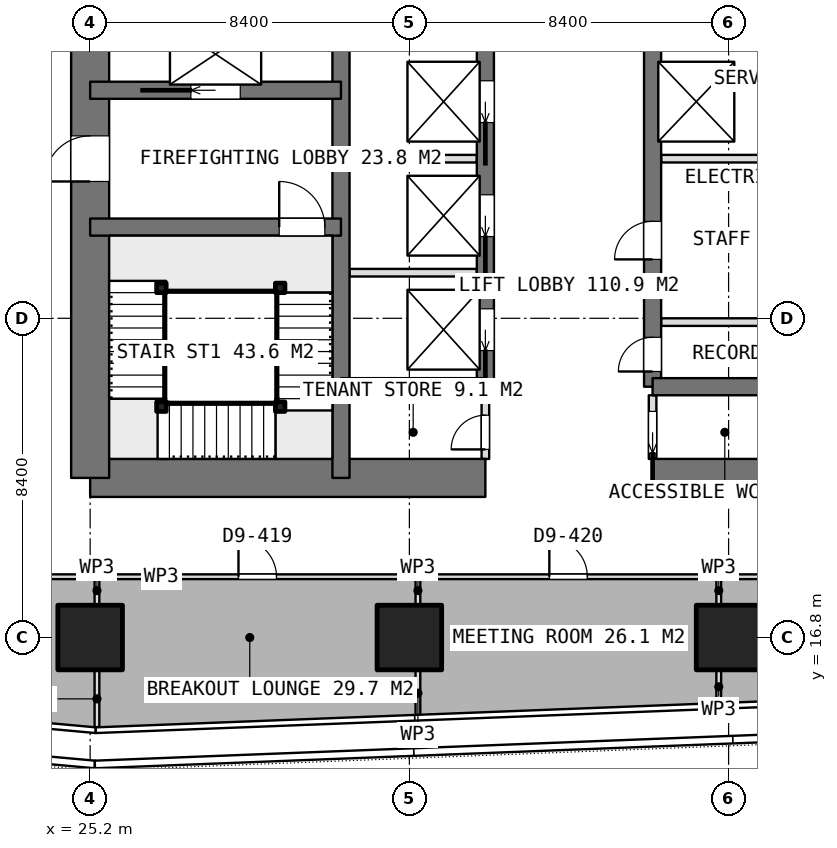
"""IFC4 building model, lengths in metres.
Left out: names, types, materials, properties, quantities, classifications, styles, units other than length and angle.
Written with IfcOpenShell. Run it as: python <this file> out.ifc"""

import sys

from ifc_helpers import new_model, si_unit, direction, frame, frame_2d, origin, origin_2d, place, context, subcontext, project, spatial, rectangle, extrude, element, fill, save


model = new_model("IFC4")
c1 = context("Model", 3, precision=1e-05, world=origin(), true_north=direction((0.0, 1.0)))
c2 = subcontext(c1, "Body", "Model", "MODEL_VIEW")
j1 = project(units=[si_unit("LENGTHUNIT", "METRE"), si_unit("PLANEANGLEUNIT", "RADIAN")], contexts=[c1])
p1 = place(None, origin())
s1 = spatial("IfcSite", under=j1, at=p1, CompositionType="ELEMENT")
p2 = place(p1, origin())
s2 = spatial("IfcBuilding", under=s1, at=p2, CompositionType="ELEMENT")
p3 = place(p2, frame((0.0, 0.0, 117.8)))
s3 = spatial("IfcBuildingStorey", under=s2, at=p3, CompositionType="ELEMENT", Elevation=117.8)
p4 = place(p3, frame((25.2, 21.0, 0.0), z_axis=(0.0, 0.0, 1.0), x_axis=(1.0, 0.0, 0.0)))
e1 = element("IfcWall", 1, at=p4, inside=s3, PredefinedType="SHEAR", context=c2, shape_type="SweptSolid", body=[
    extrude(rectangle(XDim=10.4, YDim=1.0, at=frame_2d((5.2, 0.0))), origin(), (0.0, 0.0, 1.0), 3.75),
])
p5 = place(p3, frame((40.0, 21.0, 0.0), z_axis=(0.0, 0.0, 1.0), x_axis=(1.0, 0.0, 0.0)))
e2 = element("IfcWall", 2, at=p5, inside=s3, PredefinedType="SHEAR", context=c2, shape_type="SweptSolid", body=[
    extrude(rectangle(XDim=10.4, YDim=1.0, at=frame_2d((5.2, 0.0))), origin(), (0.0, 0.0, 1.0), 3.75),
])
p6 = place(p3, frame((25.2, 21.0, 0.0), z_axis=(0.0, 0.0, 1.0), x_axis=(0.0, 1.0, 0.0)))
e3 = element("IfcWall", 3, at=p6, inside=s3, PredefinedType="SHEAR", context=c2, shape_type="SweptSolid", body=[
    extrude(rectangle(XDim=25.2, YDim=1.0, at=frame_2d((12.6, 0.0))), origin(), (0.0, 0.0, 1.0), 3.75),
])
p7 = place(p6, frame((7.8, 0.0, 0.0)))
e4 = element("IfcOpeningElement", 4, at=p7, cuts=e3, PredefinedType="OPENING", context=c2, shape_type="SweptSolid", body=[
    extrude(rectangle(XDim=1.2, YDim=2.1, at=frame_2d((0.6, 1.05))), frame((0.0, 0.51, 0.0), z_axis=(0.0, -1.0, 0.0), x_axis=(1.0, 0.0, 0.0)), (0.0, 0.0, 1.0), 1.02),
])
p8 = place(p6, frame((14.25, 0.0, 0.0)))
e5 = element("IfcOpeningElement", 5, at=p8, cuts=e3, PredefinedType="OPENING", context=c2, shape_type="SweptSolid", body=[
    extrude(rectangle(XDim=0.9, YDim=2.1, at=frame_2d((0.45, 1.05))), frame((0.0, 0.51, 0.0), z_axis=(0.0, -1.0, 0.0), x_axis=(1.0, 0.0, 0.0)), (0.0, 0.0, 1.0), 1.02),
])
p9 = place(p6, frame((16.85, 0.0, 0.0)))
e6 = element("IfcOpeningElement", 6, at=p9, cuts=e3, PredefinedType="OPENING", context=c2, shape_type="SweptSolid", body=[
    extrude(rectangle(XDim=0.9, YDim=2.1, at=frame_2d((0.45, 1.05))), frame((0.0, 0.51, 0.0), z_axis=(0.0, -1.0, 0.0), x_axis=(1.0, 0.0, 0.0)), (0.0, 0.0, 1.0), 1.02),
])
p10 = place(p6, frame((19.025, 0.0, 0.0)))
e7 = element("IfcOpeningElement", 7, at=p10, cuts=e3, PredefinedType="OPENING", context=c2, shape_type="SweptSolid", body=[
    extrude(rectangle(XDim=1.2, YDim=2.1, at=frame_2d((0.6, 1.05))), frame((0.0, 0.51, 0.0), z_axis=(0.0, -1.0, 0.0), x_axis=(1.0, 0.0, 0.0)), (0.0, 0.0, 1.0), 1.02),
])
p11 = place(p3, frame((31.8, 21.0, 0.0), z_axis=(0.0, 0.0, 1.0), x_axis=(0.0, 1.0, 0.0)))
e8 = element("IfcWall", 8, at=p11, inside=s3, PredefinedType="SHEAR", context=c2, shape_type="SweptSolid", body=[
    extrude(rectangle(XDim=25.2, YDim=0.45, at=frame_2d((12.6, 0.0))), origin(), (0.0, 0.0, 1.0), 3.75),
])
p12 = place(p3, frame((35.6, 23.4, 0.0), z_axis=(0.0, 0.0, 1.0), x_axis=(0.0, 1.0, 0.0)))
e9 = element("IfcWall", 9, at=p12, inside=s3, PredefinedType="SHEAR", context=c2, shape_type="SweptSolid", body=[
    extrude(rectangle(XDim=18.0, YDim=0.45, at=frame_2d((9.0, 0.0))), origin(), (0.0, 0.0, 1.0), 3.75),
])
p13 = place(p12, frame((0.95, 0.0, 0.0)))
e10 = element("IfcOpeningElement", 10, at=p13, cuts=e9, PredefinedType="OPENING", context=c2, shape_type="SweptSolid", body=[
    extrude(rectangle(XDim=1.1, YDim=2.1, at=frame_2d((0.55, 1.05))), frame((0.0, 0.235, 0.0), z_axis=(0.0, -1.0, 0.0), x_axis=(1.0, 0.0, 0.0)), (0.0, 0.0, 1.0), 0.47),
])
p14 = place(p12, frame((3.95, 0.0, 0.0)))
e11 = element("IfcOpeningElement", 11, at=p14, cuts=e9, PredefinedType="OPENING", context=c2, shape_type="SweptSolid", body=[
    extrude(rectangle(XDim=1.1, YDim=2.1, at=frame_2d((0.55, 1.05))), frame((0.0, 0.235, 0.0), z_axis=(0.0, -1.0, 0.0), x_axis=(1.0, 0.0, 0.0)), (0.0, 0.0, 1.0), 0.47),
])
p15 = place(p12, frame((6.95, 0.0, 0.0)))
e12 = element("IfcOpeningElement", 12, at=p15, cuts=e9, PredefinedType="OPENING", context=c2, shape_type="SweptSolid", body=[
    extrude(rectangle(XDim=1.1, YDim=2.1, at=frame_2d((0.55, 1.05))), frame((0.0, 0.235, 0.0), z_axis=(0.0, -1.0, 0.0), x_axis=(1.0, 0.0, 0.0)), (0.0, 0.0, 1.0), 0.47),
])
p16 = place(p12, frame((9.95, 0.0, 0.0)))
e13 = element("IfcOpeningElement", 13, at=p16, cuts=e9, PredefinedType="OPENING", context=c2, shape_type="SweptSolid", body=[
    extrude(rectangle(XDim=1.1, YDim=2.1, at=frame_2d((0.55, 1.05))), frame((0.0, 0.235, 0.0), z_axis=(0.0, -1.0, 0.0), x_axis=(1.0, 0.0, 0.0)), (0.0, 0.0, 1.0), 0.47),
])
p17 = place(p12, frame((12.95, 0.0, 0.0)))
e14 = element("IfcOpeningElement", 14, at=p17, cuts=e9, PredefinedType="OPENING", context=c2, shape_type="SweptSolid", body=[
    extrude(rectangle(XDim=1.1, YDim=2.1, at=frame_2d((0.55, 1.05))), frame((0.0, 0.235, 0.0), z_axis=(0.0, -1.0, 0.0), x_axis=(1.0, 0.0, 0.0)), (0.0, 0.0, 1.0), 0.47),
])
p18 = place(p12, frame((15.95, 0.0, 0.0)))
e15 = element("IfcOpeningElement", 15, at=p18, cuts=e9, PredefinedType="OPENING", context=c2, shape_type="SweptSolid", body=[
    extrude(rectangle(XDim=1.1, YDim=2.1, at=frame_2d((0.55, 1.05))), frame((0.0, 0.235, 0.0), z_axis=(0.0, -1.0, 0.0), x_axis=(1.0, 0.0, 0.0)), (0.0, 0.0, 1.0), 0.47),
])
p19 = place(p3, frame((40.0, 23.4, 0.0), z_axis=(0.0, 0.0, 1.0), x_axis=(0.0, 1.0, 0.0)))
e16 = element("IfcWall", 16, at=p19, inside=s3, PredefinedType="SHEAR", context=c2, shape_type="SweptSolid", body=[
    extrude(rectangle(XDim=18.0, YDim=0.45, at=frame_2d((9.0, 0.0))), origin(), (0.0, 0.0, 1.0), 3.75),
])
p20 = place(p19, frame((0.4, 0.0, 0.0)))
e17 = element("IfcOpeningElement", 17, at=p20, cuts=e16, PredefinedType="OPENING", context=c2, shape_type="SweptSolid", body=[
    extrude(rectangle(XDim=0.9, YDim=2.1, at=frame_2d((0.45, 1.05))), frame((0.0, 0.235, 0.0), z_axis=(0.0, -1.0, 0.0), x_axis=(1.0, 0.0, 0.0)), (0.0, 0.0, 1.0), 0.47),
])
p21 = place(p19, frame((3.35, 0.0, 0.0)))
e18 = element("IfcOpeningElement", 18, at=p21, cuts=e16, PredefinedType="OPENING", context=c2, shape_type="SweptSolid", body=[
    extrude(rectangle(XDim=1.0, YDim=2.1, at=frame_2d((0.5, 1.05))), frame((0.0, 0.235, 0.0), z_axis=(0.0, -1.0, 0.0), x_axis=(1.0, 0.0, 0.0)), (0.0, 0.0, 1.0), 0.47),
])
for number, where, z_axis, x_axis in (
    (19, (31.8, 23.4, 0.0), (0.0, 0.0, 1.0), (1.0, 0.0, 0.0)),
    (20, (40.0, 23.4, 0.0), (0.0, 0.0, 1.0), (1.0, 0.0, 0.0)),
):
    element("IfcWall", number, at=place(p3, frame(where, z_axis=z_axis, x_axis=x_axis)), inside=s3, PredefinedType="SHEAR", context=c2, shape_type="SweptSolid", body=[
        extrude(rectangle(XDim=3.8, YDim=0.45, at=frame_2d((1.9, 0.0))), origin(), (0.0, 0.0, 1.0), 3.75),
    ])
p22 = place(p3, frame((25.2, 27.6, 0.0), z_axis=(0.0, 0.0, 1.0), x_axis=(1.0, 0.0, 0.0)))
e21 = element("IfcWall", 21, at=p22, inside=s3, PredefinedType="SHEAR", context=c2, shape_type="SweptSolid", body=[
    extrude(rectangle(XDim=6.6, YDim=0.45, at=frame_2d((3.3, 0.0))), origin(), (0.0, 0.0, 1.0), 3.75),
])
p23 = place(p22, frame((4.975, 0.0, 0.0)))
e22 = element("IfcOpeningElement", 22, at=p23, cuts=e21, PredefinedType="OPENING", context=c2, shape_type="SweptSolid", body=[
    extrude(rectangle(XDim=1.2, YDim=2.1, at=frame_2d((0.6, 1.05))), frame((0.0, 0.235, 0.0), z_axis=(0.0, -1.0, 0.0), x_axis=(1.0, 0.0, 0.0)), (0.0, 0.0, 1.0), 0.47),
])
p24 = place(p3, frame((25.2, 31.2, 0.0), z_axis=(0.0, 0.0, 1.0), x_axis=(1.0, 0.0, 0.0)))
e23 = element("IfcWall", 23, at=p24, inside=s3, PredefinedType="SHEAR", context=c2, shape_type="SweptSolid", body=[
    extrude(rectangle(XDim=6.6, YDim=0.45, at=frame_2d((3.3, 0.0))), origin(), (0.0, 0.0, 1.0), 3.75),
])
p25 = place(p24, frame((2.65, 0.0, 0.0)))
e24 = element("IfcOpeningElement", 24, at=p25, cuts=e23, PredefinedType="OPENING", context=c2, shape_type="SweptSolid", body=[
    extrude(rectangle(XDim=1.3, YDim=2.1, at=frame_2d((0.65, 1.05))), frame((0.0, 0.235, 0.0), z_axis=(0.0, -1.0, 0.0), x_axis=(1.0, 0.0, 0.0)), (0.0, 0.0, 1.0), 0.47),
])
for number, where, z_axis, x_axis in (
    (25, (25.2, 16.8, 0.0), (0.0, 0.0, 1.0), (1.0, 0.0, 0.0)),
    (26, (33.6, 16.8, 0.0), (0.0, 0.0, 1.0), (1.0, 0.0, 0.0)),
    (27, (42.0, 16.8, 0.0), (0.0, 0.0, 1.0), (1.0, 0.0, 0.0)),
):
    element("IfcColumn", number, at=place(p3, frame(where, z_axis=z_axis, x_axis=x_axis)), inside=s3, PredefinedType="COLUMN", context=c2, shape_type="SweptSolid", body=[
        extrude(rectangle(XDim=1.7, YDim=1.7, at=origin_2d()), origin(), (0.0, 0.0, 1.0), 3.75),
    ])
for number, where, z_axis, x_axis in (
    (28, (32.025, 26.4, 0.0), (0.0, 0.0, 1.0), (1.0, 0.0, 0.0)),
    (29, (32.025, 29.4, 0.0), (0.0, 0.0, 1.0), (1.0, 0.0, 0.0)),
):
    element("IfcWall", number, at=place(p3, frame(where, z_axis=z_axis, x_axis=x_axis)), inside=s3, PredefinedType="PARTITIONING", context=c2, shape_type="SweptSolid", body=[
        extrude(rectangle(XDim=3.35, YDim=0.2, at=frame_2d((1.675, 0.0))), origin(), (0.0, 0.0, 1.0), 3.5),
    ])
p26 = place(p3, frame((40.225, 29.4, 0.0), z_axis=(0.0, 0.0, 1.0), x_axis=(1.0, 0.0, 0.0)))
e30 = element("IfcWall", 30, at=p26, inside=s3, PredefinedType="PARTITIONING", context=c2, shape_type="SweptSolid", body=[
    extrude(rectangle(XDim=3.35, YDim=0.2, at=frame_2d((1.675, 0.0))), origin(), (0.0, 0.0, 1.0), 3.5),
])
p27 = place(p3, frame((40.0, 21.5, 0.0), z_axis=(0.0, 0.0, 1.0), x_axis=(0.0, 1.0, 0.0)))
e31 = element("IfcWall", 31, at=p27, inside=s3, PredefinedType="PARTITIONING", context=c2, shape_type="SweptSolid", body=[
    extrude(rectangle(XDim=1.675, YDim=0.2, at=frame_2d((0.837, 0.0))), origin(), (0.0, 0.0, 1.0), 3.5),
])
p28 = place(p27, frame((0.15, 0.0, 0.0)))
e32 = element("IfcOpeningElement", 32, at=p28, cuts=e31, PredefinedType="OPENING", context=c2, shape_type="SweptSolid", body=[
    extrude(rectangle(XDim=1.1, YDim=2.1, at=frame_2d((0.55, 1.05))), frame((0.0, 0.11, 0.0), z_axis=(0.0, -1.0, 0.0), x_axis=(1.0, 0.0, 0.0)), (0.0, 0.0, 1.0), 0.22),
])
p29 = place(p3, frame((35.6, 21.5, 0.0), z_axis=(0.0, 0.0, 1.0), x_axis=(0.0, 1.0, 0.0)))
e33 = element("IfcWall", 33, at=p29, inside=s3, PredefinedType="PARTITIONING", context=c2, shape_type="SweptSolid", body=[
    extrude(rectangle(XDim=1.675, YDim=0.2, at=frame_2d((0.837, 0.0))), origin(), (0.0, 0.0, 1.0), 3.5),
])
p30 = place(p29, frame((0.25, 0.0, 0.0)))
e34 = element("IfcOpeningElement", 34, at=p30, cuts=e33, PredefinedType="OPENING", context=c2, shape_type="SweptSolid", body=[
    extrude(rectangle(XDim=0.9, YDim=2.1, at=frame_2d((0.45, 1.05))), frame((0.0, 0.11, 0.0), z_axis=(0.0, -1.0, 0.0), x_axis=(1.0, 0.0, 0.0)), (0.0, 0.0, 1.0), 0.22),
])
p31 = place(p3, frame((40.225, 25.1, 0.0), z_axis=(0.0, 0.0, 1.0), x_axis=(1.0, 0.0, 0.0)))
e35 = element("IfcWall", 35, at=p31, inside=s3, PredefinedType="PARTITIONING", context=c2, shape_type="SweptSolid", body=[
    extrude(rectangle(XDim=3.35, YDim=0.2, at=frame_2d((1.675, 0.0))), origin(), (0.0, 0.0, 1.0), 3.5),
])
p32 = place(p3, frame((41.741, 18.4, 0.0), z_axis=(0.0, 0.0, 1.0), x_axis=(1.0, 0.0, 0.0)))
e36 = element("IfcWall", 36, at=p32, inside=s3, PredefinedType="PARTITIONING", context=c2, shape_type="SweptSolid", body=[
    extrude(rectangle(XDim=8.195, YDim=0.125, at=frame_2d((4.098, 0.0))), origin(), (0.0, 0.0, 1.0), 3.5),
])
p33 = place(p32, frame((3.597, 0.0, 0.0)))
e37 = element("IfcOpeningElement", 37, at=p33, cuts=e36, PredefinedType="OPENING", context=c2, shape_type="SweptSolid", body=[
    extrude(rectangle(XDim=1.0, YDim=2.1, at=frame_2d((0.5, 1.05))), frame((0.0, 0.073, 0.0), z_axis=(0.0, -1.0, 0.0), x_axis=(1.0, 0.0, 0.0)), (0.0, 0.0, 1.0), 0.145),
])
p34 = place(p3, frame((41.741, 15.08, 0.0), z_axis=(0.0, 0.0, 1.0), x_axis=(0.0, 1.0, 0.0)))
e38 = element("IfcWall", 38, at=p34, inside=s3, PredefinedType="PARTITIONING", context=c2, shape_type="SweptSolid", body=[
    extrude(rectangle(XDim=0.85, YDim=0.125, at=frame_2d((0.425, 0.0))), origin(), (0.0, 0.0, 1.0), 3.5),
])
p35 = place(p3, frame((41.741, 17.67, 0.0), z_axis=(0.0, 0.0, 1.0), x_axis=(0.0, 1.0, 0.0)))
e39 = element("IfcWall", 39, at=p35, inside=s3, PredefinedType="PARTITIONING", context=c2, shape_type="SweptSolid", body=[
    extrude(rectangle(XDim=0.73, YDim=0.125, at=frame_2d((0.365, 0.0))), origin(), (0.0, 0.0, 1.0), 3.5),
])
p36 = place(p3, frame((19.2, 18.4, 0.0), z_axis=(0.0, 0.0, 1.0), x_axis=(1.0, 0.0, 0.0)))
e40 = element("IfcWall", 40, at=p36, inside=s3, PredefinedType="PARTITIONING", context=c2, shape_type="SweptSolid", body=[
    extrude(rectangle(XDim=6.179, YDim=0.125, at=frame_2d((3.089, 0.0))), origin(), (0.0, 0.0, 1.0), 3.5),
])
p37 = place(p3, frame((25.379, 18.4, 0.0), z_axis=(0.0, 0.0, 1.0), x_axis=(0.0, -1.0, 0.0)))
e41 = element("IfcWall", 41, at=p37, inside=s3, PredefinedType="PARTITIONING", context=c2, shape_type="SweptSolid", body=[
    extrude(rectangle(XDim=0.73, YDim=0.125, at=frame_2d((0.365, 0.0))), origin(), (0.0, 0.0, 1.0), 3.5),
])
p38 = place(p3, frame((25.379, 15.93, 0.0), z_axis=(0.0, 0.0, 1.0), x_axis=(0.0, -1.0, 0.0)))
e42 = element("IfcWall", 42, at=p38, inside=s3, PredefinedType="PARTITIONING", context=c2, shape_type="SweptSolid", body=[
    extrude(rectangle(XDim=1.487, YDim=0.125, at=frame_2d((0.743, 0.0))), origin(), (0.0, 0.0, 1.0), 3.5),
])
p39 = place(p3, frame((25.38, 18.4, 0.0), z_axis=(0.0, 0.0, 1.0), x_axis=(1.0, 0.0, 0.0)))
e43 = element("IfcWall", 43, at=p39, inside=s3, PredefinedType="PARTITIONING", context=c2, shape_type="SweptSolid", body=[
    extrude(rectangle(XDim=8.445, YDim=0.125, at=frame_2d((4.223, 0.0))), origin(), (0.0, 0.0, 1.0), 3.5),
])
p40 = place(p39, frame((3.723, 0.0, 0.0)))
e44 = element("IfcOpeningElement", 44, at=p40, cuts=e43, PredefinedType="OPENING", context=c2, shape_type="SweptSolid", body=[
    extrude(rectangle(XDim=1.0, YDim=2.1, at=frame_2d((0.5, 1.05))), frame((0.0, 0.073, 0.0), z_axis=(0.0, -1.0, 0.0), x_axis=(1.0, 0.0, 0.0)), (0.0, 0.0, 1.0), 0.145),
])
p41 = place(p3, frame((33.825, 18.4, 0.0), z_axis=(0.0, 0.0, 1.0), x_axis=(0.0, -1.0, 0.0)))
e45 = element("IfcWall", 45, at=p41, inside=s3, PredefinedType="PARTITIONING", context=c2, shape_type="SweptSolid", body=[
    extrude(rectangle(XDim=0.73, YDim=0.125, at=frame_2d((0.365, 0.0))), origin(), (0.0, 0.0, 1.0), 3.5),
])
p42 = place(p3, frame((33.825, 15.93, 0.0), z_axis=(0.0, 0.0, 1.0), x_axis=(0.0, -1.0, 0.0)))
e46 = element("IfcWall", 46, at=p42, inside=s3, PredefinedType="PARTITIONING", context=c2, shape_type="SweptSolid", body=[
    extrude(rectangle(XDim=1.188, YDim=0.125, at=frame_2d((0.594, 0.0))), origin(), (0.0, 0.0, 1.0), 3.5),
])
p43 = place(p3, frame((33.826, 18.4, 0.0), z_axis=(0.0, 0.0, 1.0), x_axis=(1.0, 0.0, 0.0)))
e47 = element("IfcWall", 47, at=p43, inside=s3, PredefinedType="PARTITIONING", context=c2, shape_type="SweptSolid", body=[
    extrude(rectangle(XDim=7.914, YDim=0.125, at=frame_2d((3.957, 0.0))), origin(), (0.0, 0.0, 1.0), 3.5),
])
p44 = place(p43, frame((3.457, 0.0, 0.0)))
e48 = element("IfcOpeningElement", 48, at=p44, cuts=e47, PredefinedType="OPENING", context=c2, shape_type="SweptSolid", body=[
    extrude(rectangle(XDim=1.0, YDim=2.1, at=frame_2d((0.5, 1.05))), frame((0.0, 0.073, 0.0), z_axis=(0.0, -1.0, 0.0), x_axis=(1.0, 0.0, 0.0)), (0.0, 0.0, 1.0), 0.145),
])
for number, where, z_axis, x_axis in (
    (49, (30.2, 26.0, 0.0), (0.0, 0.0, 1.0), (1.0, 0.0, 0.0)),
    (50, (30.2, 22.875, 0.0), (0.0, 0.0, 1.0), (1.0, 0.0, 0.0)),
    (51, (27.075, 22.875, 0.0), (0.0, 0.0, 1.0), (1.0, 0.0, 0.0)),
    (52, (27.075, 26.0, 0.0), (0.0, 0.0, 1.0), (1.0, 0.0, 0.0)),
):
    element("IfcColumn", number, at=place(p3, frame(where, z_axis=z_axis, x_axis=x_axis)), inside=s3, PredefinedType="COLUMN", context=c2, shape_type="SweptSolid", body=[
        extrude(rectangle(XDim=0.25, YDim=0.25, at=origin_2d()), origin(), (0.0, 0.0, 1.0), 3.75),
    ])
p45 = place(p7, origin())
e53 = element("IfcDoor", 53, at=p45, inside=s3, OperationType="SINGLE_SWING_LEFT", PredefinedType="DOOR", context=c2, shape_type="SweptSolid", body=[
    extrude(rectangle(XDim=1.2, YDim=2.1, at=frame_2d((0.6, 1.05))), frame((0.0, 0.025, 0.0), z_axis=(0.0, -1.0, 0.0), x_axis=(1.0, 0.0, 0.0)), (0.0, 0.0, 1.0), 0.05),
])
fill(e4, e53)
p46 = place(p28, origin())
e54 = element("IfcDoor", 54, at=p46, inside=s3, OperationType="SLIDING_TO_LEFT", PredefinedType="DOOR", context=c2, shape_type="SweptSolid", body=[
    extrude(rectangle(XDim=1.1, YDim=2.1, at=frame_2d((0.55, 1.05))), frame((0.0, 0.025, 0.0), z_axis=(0.0, -1.0, 0.0), x_axis=(1.0, 0.0, 0.0)), (0.0, 0.0, 1.0), 0.05),
])
fill(e32, e54)
p47 = place(p30, origin())
e55 = element("IfcDoor", 55, at=p47, inside=s3, OperationType="SINGLE_SWING_LEFT", PredefinedType="DOOR", context=c2, shape_type="SweptSolid", body=[
    extrude(rectangle(XDim=0.9, YDim=2.1, at=frame_2d((0.45, 1.05))), frame((0.0, 0.025, 0.0), z_axis=(0.0, -1.0, 0.0), x_axis=(1.0, 0.0, 0.0)), (0.0, 0.0, 1.0), 0.05),
])
fill(e34, e55)
p48 = place(p20, origin())
e56 = element("IfcDoor", 56, at=p48, inside=s3, OperationType="SINGLE_SWING_LEFT", PredefinedType="DOOR", context=c2, shape_type="SweptSolid", body=[
    extrude(rectangle(XDim=0.9, YDim=2.1, at=frame_2d((0.45, 1.05))), frame((0.0, 0.025, 0.0), z_axis=(0.0, -1.0, 0.0), x_axis=(1.0, 0.0, 0.0)), (0.0, 0.0, 1.0), 0.05),
])
fill(e17, e56)
p49 = place(p21, origin())
e57 = element("IfcDoor", 57, at=p49, inside=s3, OperationType="SINGLE_SWING_LEFT", PredefinedType="DOOR", context=c2, shape_type="SweptSolid", body=[
    extrude(rectangle(XDim=1.0, YDim=2.1, at=frame_2d((0.5, 1.05))), frame((0.0, 0.025, 0.0), z_axis=(0.0, -1.0, 0.0), x_axis=(1.0, 0.0, 0.0)), (0.0, 0.0, 1.0), 0.05),
])
fill(e18, e57)
p50 = place(p13, origin())
e58 = element("IfcDoor", 58, at=p50, inside=s3, OperationType="SLIDING_TO_LEFT", PredefinedType="USERDEFINED", context=c2, shape_type="SweptSolid", body=[
    extrude(rectangle(XDim=1.1, YDim=2.1, at=frame_2d((0.55, 1.05))), frame((0.0, 0.025, 0.0), z_axis=(0.0, -1.0, 0.0), x_axis=(1.0, 0.0, 0.0)), (0.0, 0.0, 1.0), 0.05),
])
fill(e10, e58)
p51 = place(p14, origin())
e59 = element("IfcDoor", 59, at=p51, inside=s3, OperationType="SLIDING_TO_LEFT", PredefinedType="USERDEFINED", context=c2, shape_type="SweptSolid", body=[
    extrude(rectangle(XDim=1.1, YDim=2.1, at=frame_2d((0.55, 1.05))), frame((0.0, 0.025, 0.0), z_axis=(0.0, -1.0, 0.0), x_axis=(1.0, 0.0, 0.0)), (0.0, 0.0, 1.0), 0.05),
])
fill(e11, e59)
p52 = place(p15, origin())
e60 = element("IfcDoor", 60, at=p52, inside=s3, OperationType="SLIDING_TO_LEFT", PredefinedType="USERDEFINED", context=c2, shape_type="SweptSolid", body=[
    extrude(rectangle(XDim=1.1, YDim=2.1, at=frame_2d((0.55, 1.05))), frame((0.0, 0.025, 0.0), z_axis=(0.0, -1.0, 0.0), x_axis=(1.0, 0.0, 0.0)), (0.0, 0.0, 1.0), 0.05),
])
fill(e12, e60)
p53 = place(p25, origin())
e61 = element("IfcDoor", 61, at=p53, inside=s3, OperationType="SLIDING_TO_LEFT", PredefinedType="USERDEFINED", context=c2, shape_type="SweptSolid", body=[
    extrude(rectangle(XDim=1.3, YDim=2.1, at=frame_2d((0.65, 1.05))), frame((0.0, 0.025, 0.0), z_axis=(0.0, -1.0, 0.0), x_axis=(1.0, 0.0, 0.0)), (0.0, 0.0, 1.0), 0.05),
])
fill(e24, e61)
p54 = place(p40, origin())
e62 = element("IfcDoor", 62, at=p54, inside=s3, OperationType="SINGLE_SWING_LEFT", PredefinedType="DOOR", context=c2, shape_type="SweptSolid", body=[
    extrude(rectangle(XDim=1.0, YDim=2.1, at=frame_2d((0.5, 1.05))), frame((0.0, 0.025, 0.0), z_axis=(0.0, -1.0, 0.0), x_axis=(1.0, 0.0, 0.0)), (0.0, 0.0, 1.0), 0.05),
])
fill(e44, e62)
p55 = place(p44, origin())
e63 = element("IfcDoor", 63, at=p55, inside=s3, OperationType="SINGLE_SWING_LEFT", PredefinedType="DOOR", context=c2, shape_type="SweptSolid", body=[
    extrude(rectangle(XDim=1.0, YDim=2.1, at=frame_2d((0.5, 1.05))), frame((0.0, 0.025, 0.0), z_axis=(0.0, -1.0, 0.0), x_axis=(1.0, 0.0, 0.0)), (0.0, 0.0, 1.0), 0.05),
])
fill(e48, e63)
p56 = place(p23, origin())
e64 = element("IfcDoor", 64, at=p56, inside=s3, OperationType="SINGLE_SWING_RIGHT", PredefinedType="DOOR", context=c2, shape_type="SweptSolid", body=[
    extrude(rectangle(XDim=1.2, YDim=2.1, at=frame_2d((0.6, 1.05))), frame((0.0, 0.025, 0.0), z_axis=(0.0, -1.0, 0.0), x_axis=(1.0, 0.0, 0.0)), (0.0, 0.0, 1.0), 0.05),
])
fill(e22, e64)
save(model, sys.argv[1])
